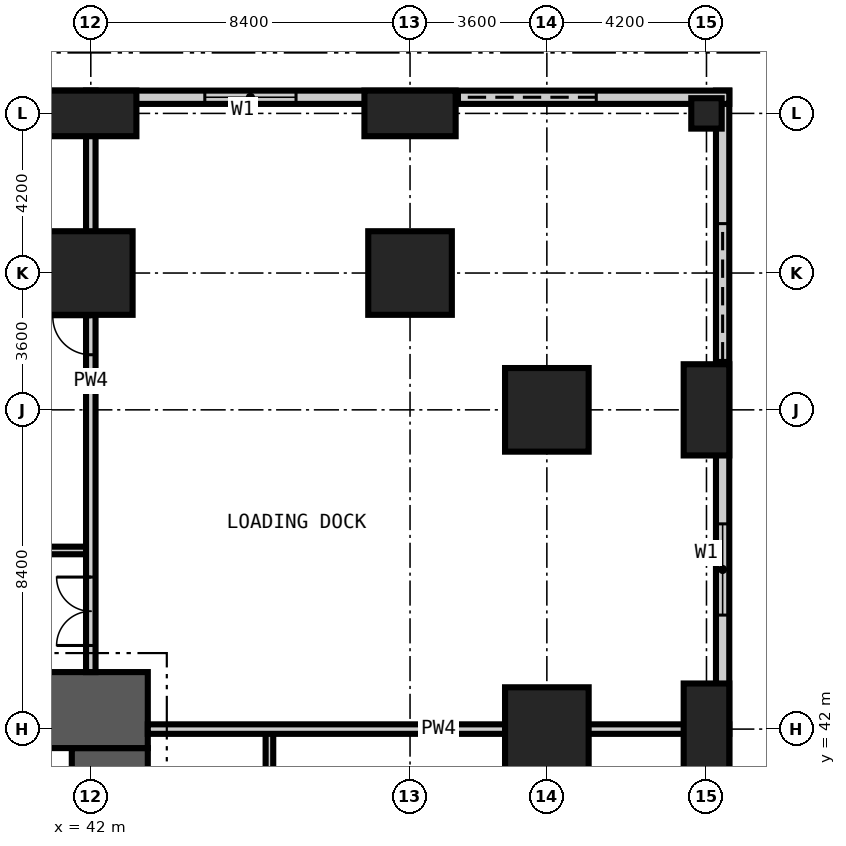
"""IFC4 building model, lengths in metres.
Left out: names, types, materials, properties, quantities, classifications, styles, units other than length and angle.
Written with IfcOpenShell. Run it as: python <this file> out.ifc"""

import sys

from ifc_helpers import new_model, si_unit, direction, frame, frame_2d, origin, origin_2d, place, context, subcontext, project, spatial, rectangle, extrude, element, fill, save


model = new_model("IFC4")
c1 = context("Model", 3, precision=1e-05, world=origin(), true_north=direction((0.0, 1.0)))
c2 = subcontext(c1, "Body", "Model", "MODEL_VIEW")
j1 = project(units=[si_unit("LENGTHUNIT", "METRE"), si_unit("PLANEANGLEUNIT", "RADIAN")], contexts=[c1])
p1 = place(None, origin())
s1 = spatial("IfcSite", under=j1, at=p1, CompositionType="ELEMENT")
p2 = place(p1, origin())
s2 = spatial("IfcBuilding", under=s1, at=p2, CompositionType="ELEMENT")
p3 = place(p2, origin())
s3 = spatial("IfcBuildingStorey", under=s2, at=p3, CompositionType="ELEMENT", Elevation=0.0)
p4 = place(p3, frame((42.0, 54.0, -0.3), z_axis=(0.0, 0.0, 1.0), x_axis=(1.0, 0.0, 0.0)))
e1 = element("IfcColumn", 1, at=p4, inside=s3, PredefinedType="COLUMN", context=c2, shape_type="SweptSolid", body=[
    extrude(rectangle(XDim=2.2, YDim=2.2, at=origin_2d()), origin(), (0.0, 0.0, 1.0), 6.0),
])
p5 = place(p3, frame((42.0, 58.2, -0.3), z_axis=(0.0, 0.0, 1.0), x_axis=(1.0, 0.0, 0.0)))
e2 = element("IfcColumn", 2, at=p5, inside=s3, PredefinedType="COLUMN", context=c2, shape_type="SweptSolid", body=[
    extrude(rectangle(XDim=2.4, YDim=1.2, at=origin_2d()), origin(), (0.0, 0.0, 1.0), 6.0),
])
p6 = place(p3, frame((50.4, 54.0, -0.3), z_axis=(0.0, 0.0, 1.0), x_axis=(1.0, 0.0, 0.0)))
e3 = element("IfcColumn", 3, at=p6, inside=s3, PredefinedType="COLUMN", context=c2, shape_type="SweptSolid", body=[
    extrude(rectangle(XDim=2.2, YDim=2.2, at=origin_2d()), origin(), (0.0, 0.0, 1.0), 6.0),
])
p7 = place(p3, frame((50.4, 58.2, -0.3), z_axis=(0.0, 0.0, 1.0), x_axis=(1.0, 0.0, 0.0)))
e4 = element("IfcColumn", 4, at=p7, inside=s3, PredefinedType="COLUMN", context=c2, shape_type="SweptSolid", body=[
    extrude(rectangle(XDim=2.4, YDim=1.2, at=origin_2d()), origin(), (0.0, 0.0, 1.0), 6.0),
])
for number, where, z_axis, x_axis in (
    (5, (54.0, 42.0, -0.3), (0.0, 0.0, 1.0), (1.0, 0.0, 0.0)),
    (6, (54.0, 50.4, -0.3), (0.0, 0.0, 1.0), (1.0, 0.0, 0.0)),
):
    element("IfcColumn", number, at=place(p3, frame(where, z_axis=z_axis, x_axis=x_axis)), inside=s3, PredefinedType="COLUMN", context=c2, shape_type="SweptSolid", body=[
        extrude(rectangle(XDim=2.2, YDim=2.2, at=origin_2d()), origin(), (0.0, 0.0, 1.0), 6.0),
    ])
for number, where, z_axis, x_axis in (
    (7, (58.2, 42.0, -0.3), (0.0, 0.0, 1.0), (1.0, 0.0, 0.0)),
    (8, (58.2, 50.4, -0.3), (0.0, 0.0, 1.0), (1.0, 0.0, 0.0)),
):
    element("IfcColumn", number, at=place(p3, frame(where, z_axis=z_axis, x_axis=x_axis)), inside=s3, PredefinedType="COLUMN", context=c2, shape_type="SweptSolid", body=[
        extrude(rectangle(XDim=1.2, YDim=2.4, at=origin_2d()), origin(), (0.0, 0.0, 1.0), 6.0),
    ])
p8 = place(p3, frame((58.2, 58.2, -0.3), z_axis=(0.0, 0.0, 1.0), x_axis=(1.0, 0.0, 0.0)))
e9 = element("IfcColumn", 9, at=p8, inside=s3, PredefinedType="COLUMN", context=c2, shape_type="SweptSolid", body=[
    extrude(rectangle(XDim=0.8, YDim=0.8, at=origin_2d()), origin(), (0.0, 0.0, 1.0), 6.0),
])
p9 = place(p3, frame((42.5, 17.3, -0.3), z_axis=(0.0, 0.0, 1.0), x_axis=(0.0, 1.0, 0.0)))
e10 = element("IfcWall", 10, at=p9, inside=s3, PredefinedType="SHEAR", context=c2, shape_type="SweptSolid", body=[
    extrude(rectangle(XDim=24.2, YDim=2.0, at=frame_2d((12.1, 0.0))), origin(), (0.0, 0.0, 1.0), 6.0),
])
p10 = place(p9, frame((0.3, 0.0, 0.3)))
e11 = element("IfcOpeningElement", 11, at=p10, cuts=e10, PredefinedType="OPENING", context=c2, shape_type="SweptSolid", body=[
    extrude(rectangle(XDim=1.2, YDim=2.2, at=frame_2d((0.6, 1.1))), frame((0.0, 1.01, 0.0), z_axis=(0.0, -1.0, 0.0), x_axis=(1.0, 0.0, 0.0)), (0.0, 0.0, 1.0), 2.02),
])
p11 = place(p9, frame((11.2, 0.0, 0.3)))
e12 = element("IfcOpeningElement", 12, at=p11, cuts=e10, PredefinedType="OPENING", context=c2, shape_type="SweptSolid", body=[
    extrude(rectangle(XDim=1.8, YDim=2.2, at=frame_2d((0.9, 1.1))), frame((0.0, 1.01, 0.0), z_axis=(0.0, -1.0, 0.0), x_axis=(1.0, 0.0, 0.0)), (0.0, 0.0, 1.0), 2.02),
])
p12 = place(p9, frame((20.0, 0.0, 0.3)))
e13 = element("IfcOpeningElement", 13, at=p12, cuts=e10, PredefinedType="OPENING", context=c2, shape_type="SweptSolid", body=[
    extrude(rectangle(XDim=1.0, YDim=2.1, at=frame_2d((0.5, 1.05))), frame((0.0, 1.01, 0.0), z_axis=(0.0, -1.0, 0.0), x_axis=(1.0, 0.0, 0.0)), (0.0, 0.0, 1.0), 2.02),
])
p13 = place(p3, frame((43.5, 42.5, -0.3), z_axis=(0.0, 0.0, 1.0), x_axis=(-1.0, 0.0, 0.0)))
e14 = element("IfcWall", 14, at=p13, inside=s3, PredefinedType="SHEAR", context=c2, shape_type="SweptSolid", body=[
    extrude(rectangle(XDim=28.2, YDim=2.0, at=frame_2d((14.1, 0.0))), origin(), (0.0, 0.0, 1.0), 6.0),
])
p14 = place(p13, frame((22.0, 0.0, 0.3)))
e15 = element("IfcOpeningElement", 15, at=p14, cuts=e14, PredefinedType="OPENING", context=c2, shape_type="SweptSolid", body=[
    extrude(rectangle(XDim=1.0, YDim=2.1, at=frame_2d((0.5, 1.05))), frame((0.0, 1.01, 0.0), z_axis=(0.0, -1.0, 0.0), x_axis=(1.0, 0.0, 0.0)), (0.0, 0.0, 1.0), 2.02),
])
p15 = place(p13, frame((11.4, 0.0, 0.3)))
e16 = element("IfcOpeningElement", 16, at=p15, cuts=e14, PredefinedType="OPENING", context=c2, shape_type="SweptSolid", body=[
    extrude(rectangle(XDim=1.2, YDim=2.2, at=frame_2d((0.6, 1.1))), frame((0.0, 1.01, 0.0), z_axis=(0.0, -1.0, 0.0), x_axis=(1.0, 0.0, 0.0)), (0.0, 0.0, 1.0), 2.02),
])
p16 = place(p3, frame((58.625, -8.4, 0.0), z_axis=(0.0, 0.0, 1.0), x_axis=(0.0, 1.0, 0.0)))
e17 = element("IfcWall", 17, at=p16, inside=s3, PredefinedType="SOLIDWALL", context=c2, shape_type="SweptSolid", body=[
    extrude(rectangle(XDim=67.2, YDim=0.35, at=frame_2d((33.6, 0.0))), origin(), (0.0, 0.0, 1.0), 5.7),
])
p17 = place(p16, frame((3.0, 0.0, 0.9)))
e18 = element("IfcOpeningElement", 18, at=p17, cuts=e17, PredefinedType="OPENING", context=c2, shape_type="SweptSolid", body=[
    extrude(rectangle(XDim=2.4, YDim=2.4, at=frame_2d((1.2, 1.2))), frame((0.0, 0.185, 0.0), z_axis=(0.0, -1.0, 0.0), x_axis=(1.0, 0.0, 0.0)), (0.0, 0.0, 1.0), 0.37),
])
p18 = place(p16, frame((18.1, 0.0, 0.0)))
e19 = element("IfcOpeningElement", 19, at=p18, cuts=e17, PredefinedType="OPENING", context=c2, shape_type="SweptSolid", body=[
    extrude(rectangle(XDim=2.4, YDim=3.0, at=frame_2d((1.2, 1.5))), frame((0.0, 0.185, 0.0), z_axis=(0.0, -1.0, 0.0), x_axis=(1.0, 0.0, 0.0)), (0.0, 0.0, 1.0), 0.37),
])
p19 = place(p16, frame((11.4, 0.0, 0.9)))
e20 = element("IfcOpeningElement", 20, at=p19, cuts=e17, PredefinedType="OPENING", context=c2, shape_type="SweptSolid", body=[
    extrude(rectangle(XDim=2.4, YDim=2.4, at=frame_2d((1.2, 1.2))), frame((0.0, 0.185, 0.0), z_axis=(0.0, -1.0, 0.0), x_axis=(1.0, 0.0, 0.0)), (0.0, 0.0, 1.0), 0.37),
])
p20 = place(p16, frame((20.7, 0.0, 0.9)))
e21 = element("IfcOpeningElement", 21, at=p20, cuts=e17, PredefinedType="OPENING", context=c2, shape_type="SweptSolid", body=[
    extrude(rectangle(XDim=2.4, YDim=2.4, at=frame_2d((1.2, 1.2))), frame((0.0, 0.185, 0.0), z_axis=(0.0, -1.0, 0.0), x_axis=(1.0, 0.0, 0.0)), (0.0, 0.0, 1.0), 0.37),
])
p21 = place(p16, frame((28.2, 0.0, 0.9)))
e22 = element("IfcOpeningElement", 22, at=p21, cuts=e17, PredefinedType="OPENING", context=c2, shape_type="SweptSolid", body=[
    extrude(rectangle(XDim=2.4, YDim=2.4, at=frame_2d((1.2, 1.2))), frame((0.0, 0.185, 0.0), z_axis=(0.0, -1.0, 0.0), x_axis=(1.0, 0.0, 0.0)), (0.0, 0.0, 1.0), 0.37),
])
p22 = place(p16, frame((36.6, 0.0, 0.9)))
e23 = element("IfcOpeningElement", 23, at=p22, cuts=e17, PredefinedType="OPENING", context=c2, shape_type="SweptSolid", body=[
    extrude(rectangle(XDim=2.4, YDim=2.4, at=frame_2d((1.2, 1.2))), frame((0.0, 0.185, 0.0), z_axis=(0.0, -1.0, 0.0), x_axis=(1.0, 0.0, 0.0)), (0.0, 0.0, 1.0), 0.37),
])
p23 = place(p16, frame((45.0, 0.0, 0.9)))
e24 = element("IfcOpeningElement", 24, at=p23, cuts=e17, PredefinedType="OPENING", context=c2, shape_type="SweptSolid", body=[
    extrude(rectangle(XDim=2.4, YDim=2.4, at=frame_2d((1.2, 1.2))), frame((0.0, 0.185, 0.0), z_axis=(0.0, -1.0, 0.0), x_axis=(1.0, 0.0, 0.0)), (0.0, 0.0, 1.0), 0.37),
])
p24 = place(p16, frame((60.1, 0.0, 0.0)))
e25 = element("IfcOpeningElement", 25, at=p24, cuts=e17, PredefinedType="OPENING", context=c2, shape_type="SweptSolid", body=[
    extrude(rectangle(XDim=3.6, YDim=4.5, at=frame_2d((1.8, 2.25))), frame((0.0, 0.185, 0.0), z_axis=(0.0, -1.0, 0.0), x_axis=(1.0, 0.0, 0.0)), (0.0, 0.0, 1.0), 0.37),
])
p25 = place(p16, frame((53.4, 0.0, 0.9)))
e26 = element("IfcOpeningElement", 26, at=p25, cuts=e17, PredefinedType="OPENING", context=c2, shape_type="SweptSolid", body=[
    extrude(rectangle(XDim=2.4, YDim=2.4, at=frame_2d((1.2, 1.2))), frame((0.0, 0.185, 0.0), z_axis=(0.0, -1.0, 0.0), x_axis=(1.0, 0.0, 0.0)), (0.0, 0.0, 1.0), 0.37),
])
p26 = place(p3, frame((58.8, 58.625, 0.0), z_axis=(0.0, 0.0, 1.0), x_axis=(-1.0, 0.0, 0.0)))
e27 = element("IfcWall", 27, at=p26, inside=s3, PredefinedType="SOLIDWALL", context=c2, shape_type="SweptSolid", body=[
    extrude(rectangle(XDim=92.4, YDim=0.35, at=frame_2d((46.2, 0.0))), origin(), (0.0, 0.0, 1.0), 5.7),
])
p27 = place(p26, frame((85.2, 0.0, 0.0)))
e28 = element("IfcOpeningElement", 28, at=p27, cuts=e27, PredefinedType="OPENING", context=c2, shape_type="SweptSolid", body=[
    extrude(rectangle(XDim=1.8, YDim=2.7, at=frame_2d((0.9, 1.35))), frame((0.0, 0.185, 0.0), z_axis=(0.0, -1.0, 0.0), x_axis=(1.0, 0.0, 0.0)), (0.0, 0.0, 1.0), 0.37),
])
p28 = place(p26, frame((87.2, 0.0, 0.9)))
e29 = element("IfcOpeningElement", 29, at=p28, cuts=e27, PredefinedType="OPENING", context=c2, shape_type="SweptSolid", body=[
    extrude(rectangle(XDim=2.4, YDim=2.4, at=frame_2d((1.2, 1.2))), frame((0.0, 0.185, 0.0), z_axis=(0.0, -1.0, 0.0), x_axis=(1.0, 0.0, 0.0)), (0.0, 0.0, 1.0), 0.37),
])
p29 = place(p26, frame((80.7, 0.0, 0.9)))
e30 = element("IfcOpeningElement", 30, at=p29, cuts=e27, PredefinedType="OPENING", context=c2, shape_type="SweptSolid", body=[
    extrude(rectangle(XDim=2.4, YDim=2.4, at=frame_2d((1.2, 1.2))), frame((0.0, 0.185, 0.0), z_axis=(0.0, -1.0, 0.0), x_axis=(1.0, 0.0, 0.0)), (0.0, 0.0, 1.0), 0.37),
])
p30 = place(p26, frame((76.2, 0.0, 0.9)))
e31 = element("IfcOpeningElement", 31, at=p30, cuts=e27, PredefinedType="OPENING", context=c2, shape_type="SweptSolid", body=[
    extrude(rectangle(XDim=2.4, YDim=2.4, at=frame_2d((1.2, 1.2))), frame((0.0, 0.185, 0.0), z_axis=(0.0, -1.0, 0.0), x_axis=(1.0, 0.0, 0.0)), (0.0, 0.0, 1.0), 0.37),
])
p31 = place(p26, frame((71.9, 0.0, 0.0)))
e32 = element("IfcOpeningElement", 32, at=p31, cuts=e27, PredefinedType="OPENING", context=c2, shape_type="SweptSolid", body=[
    extrude(rectangle(XDim=1.2, YDim=2.4, at=frame_2d((0.6, 1.2))), frame((0.0, 0.185, 0.0), z_axis=(0.0, -1.0, 0.0), x_axis=(1.0, 0.0, 0.0)), (0.0, 0.0, 1.0), 0.37),
])
p32 = place(p26, frame((63.5, 0.0, 0.0)))
e33 = element("IfcOpeningElement", 33, at=p32, cuts=e27, PredefinedType="OPENING", context=c2, shape_type="SweptSolid", body=[
    extrude(rectangle(XDim=1.2, YDim=2.4, at=frame_2d((0.6, 1.2))), frame((0.0, 0.185, 0.0), z_axis=(0.0, -1.0, 0.0), x_axis=(1.0, 0.0, 0.0)), (0.0, 0.0, 1.0), 0.37),
])
p33 = place(p26, frame((59.0, 0.0, 0.0)))
e34 = element("IfcOpeningElement", 34, at=p33, cuts=e27, PredefinedType="OPENING", context=c2, shape_type="SweptSolid", body=[
    extrude(rectangle(XDim=2.4, YDim=3.0, at=frame_2d((1.2, 1.5))), frame((0.0, 0.185, 0.0), z_axis=(0.0, -1.0, 0.0), x_axis=(1.0, 0.0, 0.0)), (0.0, 0.0, 1.0), 0.37),
])
p34 = place(p26, frame((53.4, 0.0, 0.9)))
e35 = element("IfcOpeningElement", 35, at=p34, cuts=e27, PredefinedType="OPENING", context=c2, shape_type="SweptSolid", body=[
    extrude(rectangle(XDim=2.4, YDim=2.4, at=frame_2d((1.2, 1.2))), frame((0.0, 0.185, 0.0), z_axis=(0.0, -1.0, 0.0), x_axis=(1.0, 0.0, 0.0)), (0.0, 0.0, 1.0), 0.37),
])
p35 = place(p26, frame((43.25, 0.0, 0.0)))
e36 = element("IfcOpeningElement", 36, at=p35, cuts=e27, PredefinedType="OPENING", context=c2, shape_type="SweptSolid", body=[
    extrude(rectangle(XDim=2.4, YDim=3.0, at=frame_2d((1.2, 1.5))), frame((0.0, 0.185, 0.0), z_axis=(0.0, -1.0, 0.0), x_axis=(1.0, 0.0, 0.0)), (0.0, 0.0, 1.0), 0.37),
])
p36 = place(p26, frame((37.7, 0.0, 0.0)))
e37 = element("IfcOpeningElement", 37, at=p36, cuts=e27, PredefinedType="OPENING", context=c2, shape_type="SweptSolid", body=[
    extrude(rectangle(XDim=1.2, YDim=2.4, at=frame_2d((0.6, 1.2))), frame((0.0, 0.185, 0.0), z_axis=(0.0, -1.0, 0.0), x_axis=(1.0, 0.0, 0.0)), (0.0, 0.0, 1.0), 0.37),
])
p37 = place(p26, frame((29.2, 0.0, 0.0)))
e38 = element("IfcOpeningElement", 38, at=p37, cuts=e27, PredefinedType="OPENING", context=c2, shape_type="SweptSolid", body=[
    extrude(rectangle(XDim=1.2, YDim=2.4, at=frame_2d((0.6, 1.2))), frame((0.0, 0.185, 0.0), z_axis=(0.0, -1.0, 0.0), x_axis=(1.0, 0.0, 0.0)), (0.0, 0.0, 1.0), 0.37),
])
p38 = place(p26, frame((3.5, 0.0, 0.0)))
e39 = element("IfcOpeningElement", 39, at=p38, cuts=e27, PredefinedType="OPENING", context=c2, shape_type="SweptSolid", body=[
    extrude(rectangle(XDim=3.6, YDim=4.5, at=frame_2d((1.8, 2.25))), frame((0.0, 0.185, 0.0), z_axis=(0.0, -1.0, 0.0), x_axis=(1.0, 0.0, 0.0)), (0.0, 0.0, 1.0), 0.37),
])
p39 = place(p26, frame((11.4, 0.0, 0.9)))
e40 = element("IfcOpeningElement", 40, at=p39, cuts=e27, PredefinedType="OPENING", context=c2, shape_type="SweptSolid", body=[
    extrude(rectangle(XDim=2.4, YDim=2.4, at=frame_2d((1.2, 1.2))), frame((0.0, 0.185, 0.0), z_axis=(0.0, -1.0, 0.0), x_axis=(1.0, 0.0, 0.0)), (0.0, 0.0, 1.0), 0.37),
])
p40 = place(p3, frame((46.7, 33.6, 0.0), z_axis=(0.0, 0.0, 1.0), x_axis=(0.0, 1.0, 0.0)))
e41 = element("IfcWall", 41, at=p40, inside=s3, PredefinedType="PARTITIONING", context=c2, shape_type="SweptSolid", body=[
    extrude(rectangle(XDim=8.4, YDim=0.2, at=frame_2d((4.2, 0.0))), origin(), (0.0, 0.0, 1.0), 5.7),
])
p41 = place(p40, frame((3.3, 0.0, 0.0)))
e42 = element("IfcOpeningElement", 42, at=p41, cuts=e41, PredefinedType="OPENING", context=c2, shape_type="SweptSolid", body=[
    extrude(rectangle(XDim=1.8, YDim=2.4, at=frame_2d((0.9, 1.2))), frame((0.0, 0.11, 0.0), z_axis=(0.0, -1.0, 0.0), x_axis=(1.0, 0.0, 0.0)), (0.0, 0.0, 1.0), 0.22),
])
p42 = place(p3, frame((29.4, 46.7, 0.0), z_axis=(0.0, 0.0, 1.0), x_axis=(1.0, 0.0, 0.0)))
e43 = element("IfcWall", 43, at=p42, inside=s3, PredefinedType="PARTITIONING", context=c2, shape_type="SweptSolid", body=[
    extrude(rectangle(XDim=12.6, YDim=0.2, at=frame_2d((6.3, 0.0))), origin(), (0.0, 0.0, 1.0), 5.7),
])
p43 = place(p42, frame((1.6, 0.0, 0.0)))
e44 = element("IfcOpeningElement", 44, at=p43, cuts=e43, PredefinedType="OPENING", context=c2, shape_type="SweptSolid", body=[
    extrude(rectangle(XDim=1.0, YDim=2.1, at=frame_2d((0.5, 1.05))), frame((0.0, 0.11, 0.0), z_axis=(0.0, -1.0, 0.0), x_axis=(1.0, 0.0, 0.0)), (0.0, 0.0, 1.0), 0.22),
])
p44 = place(p3, frame((42.0, 43.5, 0.0), z_axis=(0.0, 0.0, 1.0), x_axis=(0.0, 1.0, 0.0)))
e45 = element("IfcWall", 45, at=p44, inside=s3, PredefinedType="PARTITIONING", context=c2, shape_type="SweptSolid", body=[
    extrude(rectangle(XDim=15.3, YDim=0.25, at=frame_2d((7.65, 0.0))), origin(), (0.0, 0.0, 1.0), 5.7),
])
p45 = place(p44, frame((0.7, 0.0, 0.0)))
e46 = element("IfcOpeningElement", 46, at=p45, cuts=e45, PredefinedType="OPENING", context=c2, shape_type="SweptSolid", body=[
    extrude(rectangle(XDim=1.8, YDim=2.4, at=frame_2d((0.9, 1.2))), frame((0.0, 0.135, 0.0), z_axis=(0.0, -1.0, 0.0), x_axis=(1.0, 0.0, 0.0)), (0.0, 0.0, 1.0), 0.27),
])
p46 = place(p44, frame((8.35, 0.0, 0.0)))
e47 = element("IfcOpeningElement", 47, at=p46, cuts=e45, PredefinedType="OPENING", context=c2, shape_type="SweptSolid", body=[
    extrude(rectangle(XDim=1.0, YDim=2.1, at=frame_2d((0.5, 1.05))), frame((0.0, 0.135, 0.0), z_axis=(0.0, -1.0, 0.0), x_axis=(1.0, 0.0, 0.0)), (0.0, 0.0, 1.0), 0.27),
])
p47 = place(p3, frame((43.5, 42.0, 0.0), z_axis=(0.0, 0.0, 1.0), x_axis=(1.0, 0.0, 0.0)))
e48 = element("IfcWall", 48, at=p47, inside=s3, PredefinedType="PARTITIONING", context=c2, shape_type="SweptSolid", body=[
    extrude(rectangle(XDim=15.3, YDim=0.25, at=frame_2d((7.65, 0.0))), origin(), (0.0, 0.0, 1.0), 5.7),
])
p48 = place(p24, origin())
e49 = element("IfcDoor", 49, at=p48, inside=s3, OperationType="ROLLINGUP", PredefinedType="DOOR", context=c2, shape_type="SweptSolid", body=[
    extrude(rectangle(XDim=3.6, YDim=4.5, at=frame_2d((1.8, 2.25))), frame((0.0, 0.025, 0.0), z_axis=(0.0, -1.0, 0.0), x_axis=(1.0, 0.0, 0.0)), (0.0, 0.0, 1.0), 0.05),
])
fill(e25, e49)
p49 = place(p25, origin())
e50 = element("IfcWindow", 50, at=p49, inside=s3, PartitioningType="SINGLE_PANEL", PredefinedType="WINDOW", context=c2, shape_type="SweptSolid", body=[
    extrude(rectangle(XDim=2.4, YDim=2.4, at=frame_2d((1.2, 1.2))), frame((0.0, 0.03, 0.0), z_axis=(0.0, -1.0, 0.0), x_axis=(1.0, 0.0, 0.0)), (0.0, 0.0, 1.0), 0.06),
])
fill(e26, e50)
p50 = place(p38, origin())
e51 = element("IfcDoor", 51, at=p50, inside=s3, OperationType="ROLLINGUP", PredefinedType="DOOR", context=c2, shape_type="SweptSolid", body=[
    extrude(rectangle(XDim=3.6, YDim=4.5, at=frame_2d((1.8, 2.25))), frame((0.0, 0.025, 0.0), z_axis=(0.0, -1.0, 0.0), x_axis=(1.0, 0.0, 0.0)), (0.0, 0.0, 1.0), 0.05),
])
fill(e39, e51)
p51 = place(p39, origin())
e52 = element("IfcWindow", 52, at=p51, inside=s3, PartitioningType="SINGLE_PANEL", PredefinedType="WINDOW", context=c2, shape_type="SweptSolid", body=[
    extrude(rectangle(XDim=2.4, YDim=2.4, at=frame_2d((1.2, 1.2))), frame((0.0, 0.03, 0.0), z_axis=(0.0, -1.0, 0.0), x_axis=(1.0, 0.0, 0.0)), (0.0, 0.0, 1.0), 0.06),
])
fill(e40, e52)
p52 = place(p45, origin())
e53 = element("IfcDoor", 53, at=p52, inside=s3, OperationType="DOUBLE_DOOR_DOUBLE_SWING", PredefinedType="DOOR", context=c2, shape_type="SweptSolid", body=[
    extrude(rectangle(XDim=1.8, YDim=2.4, at=frame_2d((0.9, 1.2))), frame((0.0, 0.025, 0.0), z_axis=(0.0, -1.0, 0.0), x_axis=(1.0, 0.0, 0.0)), (0.0, 0.0, 1.0), 0.05),
])
fill(e46, e53)
p53 = place(p46, origin())
e54 = element("IfcDoor", 54, at=p53, inside=s3, OperationType="SINGLE_SWING_RIGHT", PredefinedType="DOOR", context=c2, shape_type="SweptSolid", body=[
    extrude(rectangle(XDim=1.0, YDim=2.1, at=frame_2d((0.5, 1.05))), frame((0.0, 0.025, 0.0), z_axis=(0.0, -1.0, 0.0), x_axis=(1.0, 0.0, 0.0)), (0.0, 0.0, 1.0), 0.05),
])
fill(e47, e54)
save(model, sys.argv[1])
